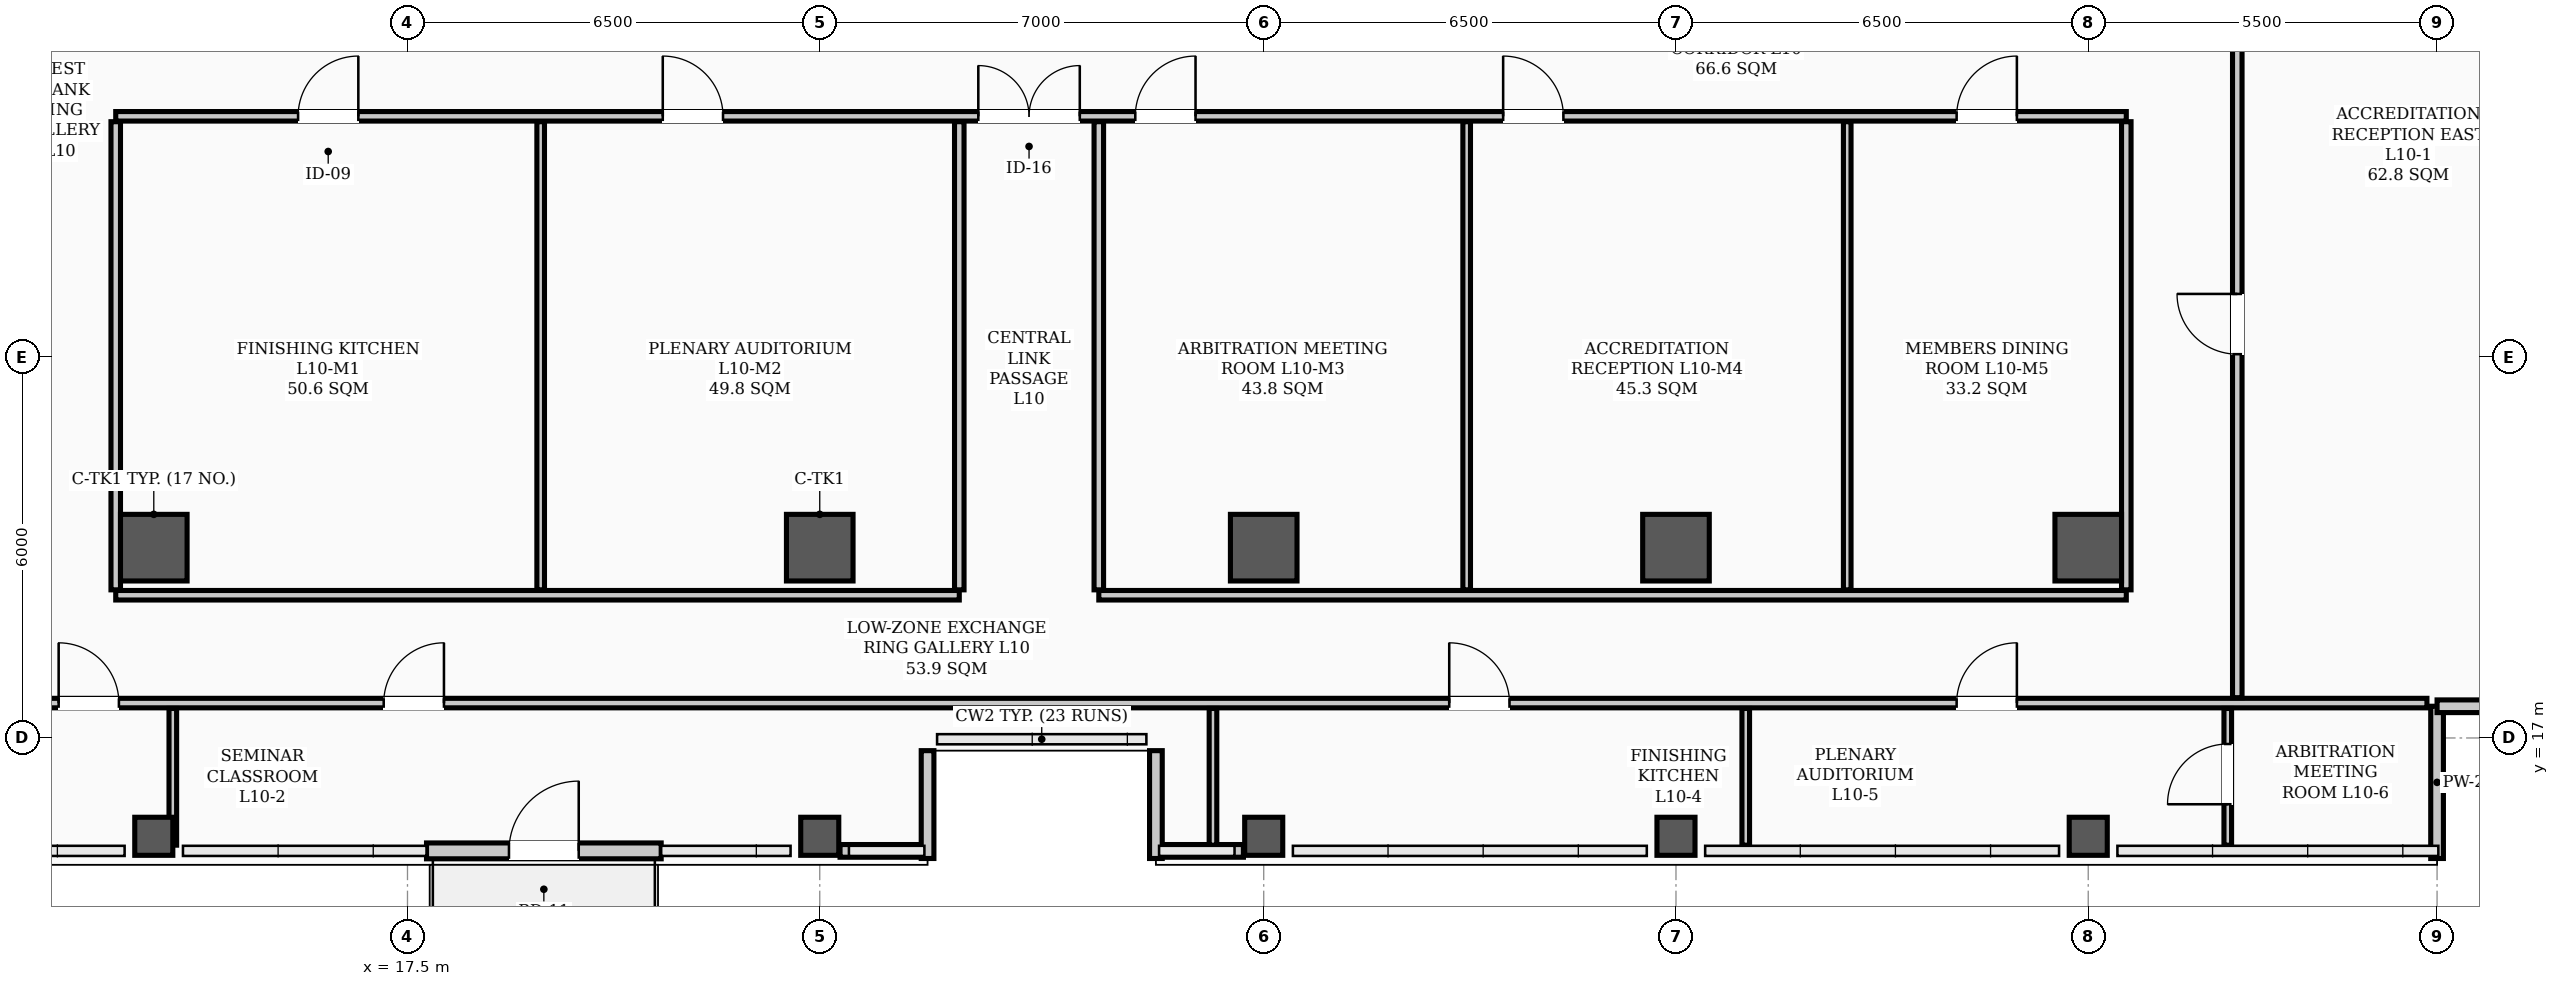
"""IFC4 building model, lengths in metres.
Left out: names, types, materials, properties, quantities, classifications, styles, units other than length and angle.
Written with IfcOpenShell. Run it as: python <this file> out.ifc"""

import sys

from ifc_helpers import new_model, si_unit, direction, frame, frame_2d, origin, origin_2d, place, context, subcontext, project, spatial, rectangle, hollow_rectangle, extrude, element, fill, save


model = new_model("IFC4")
c1 = context("Model", 3, precision=1e-05, world=origin(), true_north=direction((0.0, 1.0)))
c2 = subcontext(c1, "Body", "Model", "MODEL_VIEW")
j1 = project(units=[si_unit("LENGTHUNIT", "METRE"), si_unit("PLANEANGLEUNIT", "RADIAN")], contexts=[c1])
p1 = place(None, origin())
s1 = spatial("IfcSite", under=j1, at=p1, CompositionType="ELEMENT")
p2 = place(p1, origin())
s2 = spatial("IfcBuilding", under=s1, at=p2, CompositionType="ELEMENT")
p3 = place(p2, frame((0.0, 0.0, 42.1)))
s3 = spatial("IfcBuildingStorey", under=s2, at=p3, CompositionType="ELEMENT", Elevation=42.1)
for number, where, z_axis, x_axis in (
    (1, (13.5, 20.0, 0.0), (0.0, 0.0, 1.0), (1.0, 0.0, 0.0)),
    (2, (24.0, 20.0, 0.0), (0.0, 0.0, 1.0), (1.0, 0.0, 0.0)),
    (3, (31.0, 20.0, 0.0), (0.0, 0.0, 1.0), (1.0, 0.0, 0.0)),
    (4, (37.5, 20.0, 0.0), (0.0, 0.0, 1.0), (1.0, 0.0, 0.0)),
    (5, (44.0, 20.0, 0.0), (0.0, 0.0, 1.0), (1.0, 0.0, 0.0)),
):
    element("IfcColumn", number, at=place(p3, frame(where, z_axis=z_axis, x_axis=x_axis)), inside=s3, PredefinedType="COLUMN", context=c2, shape_type="SweptSolid", body=[
        extrude(hollow_rectangle(XDim=1.05, YDim=1.05, WallThickness=0.038, InnerFilletRadius=0.019, OuterFilletRadius=0.057, at=origin_2d()), origin(), (0.0, 0.0, 1.0), 3.9),
    ])
for number, where, z_axis, x_axis in (
    (6, (13.5, 15.45, 0.0), (0.0, 0.0, 1.0), (1.0, 0.0, 0.0)),
    (7, (24.0, 15.45, 0.0), (0.0, 0.0, 1.0), (1.0, 0.0, 0.0)),
    (8, (31.0, 15.45, 0.0), (0.0, 0.0, 1.0), (1.0, 0.0, 0.0)),
    (9, (37.5, 15.45, 0.0), (0.0, 0.0, 1.0), (1.0, 0.0, 0.0)),
    (10, (44.0, 15.45, 0.0), (0.0, 0.0, 1.0), (1.0, 0.0, 0.0)),
):
    element("IfcColumn", number, at=place(p3, frame(where, z_axis=z_axis, x_axis=x_axis)), inside=s3, PredefinedType="COLUMN", context=c2, shape_type="SweptSolid", body=[
        extrude(hollow_rectangle(XDim=0.6, YDim=0.6, WallThickness=0.026, InnerFilletRadius=0.013, OuterFilletRadius=0.039, at=origin_2d()), origin(), (0.0, 0.0, 1.0), 3.9),
    ])
for number, where, z_axis, x_axis in (
    (11, (24.32, 15.22, 0.0), (0.0, 0.0, 1.0), (1.0, 0.0, 0.0)),
    (12, (29.35, 15.22, 0.0), (0.0, 0.0, 1.0), (1.0, 0.0, 0.0)),
):
    element("IfcWall", number, at=place(p3, frame(where, z_axis=z_axis, x_axis=x_axis)), inside=s3, PredefinedType="PARAPET", context=c2, shape_type="SweptSolid", body=[
        extrude(rectangle(XDim=1.33, YDim=0.2, at=frame_2d((0.665, 0.0))), origin(), (0.0, 0.0, 1.0), 1.2),
    ])
for number, where, z_axis, x_axis in (
    (13, (49.5, 15.1, 0.0), (0.0, 0.0, 1.0), (0.0, 1.0, 0.0)),
    (14, (49.5, 17.5, 0.0), (0.0, 0.0, 1.0), (1.0, 0.0, 0.0)),
):
    element("IfcWall", number, at=place(p3, frame(where, z_axis=z_axis, x_axis=x_axis)), inside=s3, PredefinedType="PARAPET", context=c2, shape_type="SweptSolid", body=[
        extrude(rectangle(XDim=2.4, YDim=0.2, at=frame_2d((1.2, 0.0))), origin(), (0.0, 0.0, 1.0), 1.2),
    ])
for number, where, z_axis, x_axis in (
    (15, (25.7, 15.1, 0.0), (0.0, 0.0, 1.0), (0.0, 1.0, 0.0)),
    (16, (29.3, 16.8, 0.0), (0.0, 0.0, 1.0), (0.0, -1.0, 0.0)),
):
    element("IfcWall", number, at=place(p3, frame(where, z_axis=z_axis, x_axis=x_axis)), inside=s3, PredefinedType="PARAPET", context=c2, shape_type="SweptSolid", body=[
        extrude(rectangle(XDim=1.7, YDim=0.2, at=frame_2d((0.85, 0.0))), origin(), (0.0, 0.0, 1.0), 1.2),
    ])
p4 = place(p3, frame((17.8, 15.22, 0.0), z_axis=(0.0, 0.0, 1.0), x_axis=(1.0, 0.0, 0.0)))
e17 = element("IfcWall", 17, at=p4, inside=s3, PredefinedType="STANDARD", context=c2, shape_type="SweptSolid", body=[
    extrude(rectangle(XDim=3.7, YDim=0.25, at=frame_2d((1.85, 0.0))), origin(), (0.0, 0.0, 1.0), 3.18),
])
p5 = place(p4, frame((1.3, 0.0, 0.0)))
e18 = element("IfcOpeningElement", 18, at=p5, cuts=e17, PredefinedType="OPENING", context=c2, shape_type="SweptSolid", body=[
    extrude(rectangle(XDim=1.1, YDim=2.2, at=frame_2d((0.55, 1.1))), frame((0.0, 0.135, 0.0), z_axis=(0.0, -1.0, 0.0), x_axis=(1.0, 0.0, 0.0)), (0.0, 0.0, 1.0), 0.27),
])
p6 = place(p3, frame((12.9, 26.8, 0.0), z_axis=(0.0, 0.0, 1.0), x_axis=(1.0, 0.0, 0.0)))
e19 = element("IfcWall", 19, at=p6, inside=s3, PredefinedType="PARTITIONING", context=c2, shape_type="SweptSolid", body=[
    extrude(rectangle(XDim=31.7, YDim=0.15, at=frame_2d((15.85, 0.0))), origin(), (0.0, 0.0, 1.0), 3.1),
])
p7 = place(p6, frame((13.6, 0.0, 0.0)))
e20 = element("IfcOpeningElement", 20, at=p7, cuts=e19, PredefinedType="OPENING", context=c2, shape_type="SweptSolid", body=[
    extrude(rectangle(XDim=1.6, YDim=2.08, at=frame_2d((0.8, 1.04))), frame((0.0, 0.085, 0.0), z_axis=(0.0, -1.0, 0.0), x_axis=(1.0, 0.0, 0.0)), (0.0, 0.0, 1.0), 0.17),
])
p8 = place(p6, frame((2.875, 0.0, 0.0)))
e21 = element("IfcOpeningElement", 21, at=p8, cuts=e19, PredefinedType="OPENING", context=c2, shape_type="SweptSolid", body=[
    extrude(rectangle(XDim=0.95, YDim=2.08, at=frame_2d((0.475, 1.04))), frame((0.0, 0.085, 0.0), z_axis=(0.0, -1.0, 0.0), x_axis=(1.0, 0.0, 0.0)), (0.0, 0.0, 1.0), 0.17),
])
p9 = place(p6, frame((8.625, 0.0, 0.0)))
e22 = element("IfcOpeningElement", 22, at=p9, cuts=e19, PredefinedType="OPENING", context=c2, shape_type="SweptSolid", body=[
    extrude(rectangle(XDim=0.95, YDim=2.08, at=frame_2d((0.475, 1.04))), frame((0.0, 0.085, 0.0), z_axis=(0.0, -1.0, 0.0), x_axis=(1.0, 0.0, 0.0)), (0.0, 0.0, 1.0), 0.17),
])
p10 = place(p6, frame((16.075, 0.0, 0.0)))
e23 = element("IfcOpeningElement", 23, at=p10, cuts=e19, PredefinedType="OPENING", context=c2, shape_type="SweptSolid", body=[
    extrude(rectangle(XDim=0.95, YDim=2.08, at=frame_2d((0.475, 1.04))), frame((0.0, 0.085, 0.0), z_axis=(0.0, -1.0, 0.0), x_axis=(1.0, 0.0, 0.0)), (0.0, 0.0, 1.0), 0.17),
])
p11 = place(p6, frame((21.875, 0.0, 0.0)))
e24 = element("IfcOpeningElement", 24, at=p11, cuts=e19, PredefinedType="OPENING", context=c2, shape_type="SweptSolid", body=[
    extrude(rectangle(XDim=0.95, YDim=2.08, at=frame_2d((0.475, 1.04))), frame((0.0, 0.085, 0.0), z_axis=(0.0, -1.0, 0.0), x_axis=(1.0, 0.0, 0.0)), (0.0, 0.0, 1.0), 0.17),
])
p12 = place(p6, frame((29.025, 0.0, 0.0)))
e25 = element("IfcOpeningElement", 25, at=p12, cuts=e19, PredefinedType="OPENING", context=c2, shape_type="SweptSolid", body=[
    extrude(rectangle(XDim=0.95, YDim=2.08, at=frame_2d((0.475, 1.04))), frame((0.0, 0.085, 0.0), z_axis=(0.0, -1.0, 0.0), x_axis=(1.0, 0.0, 0.0)), (0.0, 0.0, 1.0), 0.17),
])
p13 = place(p3, frame((4.66, 17.55, 0.0), z_axis=(0.0, 0.0, 1.0), x_axis=(1.0, 0.0, 0.0)))
e26 = element("IfcWall", 26, at=p13, inside=s3, PredefinedType="PARTITIONING", context=c2, shape_type="SweptSolid", body=[
    extrude(rectangle(XDim=44.68, YDim=0.15, at=frame_2d((22.34, 0.0))), origin(), (0.0, 0.0, 1.0), 3.1),
])
p14 = place(p13, frame((7.34, 0.0, 0.0)))
e27 = element("IfcOpeningElement", 27, at=p14, cuts=e26, PredefinedType="OPENING", context=c2, shape_type="SweptSolid", body=[
    extrude(rectangle(XDim=0.95, YDim=2.08, at=frame_2d((0.475, 1.04))), frame((0.0, 0.085, 0.0), z_axis=(0.0, -1.0, 0.0), x_axis=(1.0, 0.0, 0.0)), (0.0, 0.0, 1.0), 0.17),
])
p15 = place(p13, frame((12.465, 0.0, 0.0)))
e28 = element("IfcOpeningElement", 28, at=p15, cuts=e26, PredefinedType="OPENING", context=c2, shape_type="SweptSolid", body=[
    extrude(rectangle(XDim=0.95, YDim=2.08, at=frame_2d((0.475, 1.04))), frame((0.0, 0.085, 0.0), z_axis=(0.0, -1.0, 0.0), x_axis=(1.0, 0.0, 0.0)), (0.0, 0.0, 1.0), 0.17),
])
p16 = place(p13, frame((29.265, 0.0, 0.0)))
e29 = element("IfcOpeningElement", 29, at=p16, cuts=e26, PredefinedType="OPENING", context=c2, shape_type="SweptSolid", body=[
    extrude(rectangle(XDim=0.95, YDim=2.08, at=frame_2d((0.475, 1.04))), frame((0.0, 0.085, 0.0), z_axis=(0.0, -1.0, 0.0), x_axis=(1.0, 0.0, 0.0)), (0.0, 0.0, 1.0), 0.17),
])
p17 = place(p13, frame((37.265, 0.0, 0.0)))
e30 = element("IfcOpeningElement", 30, at=p17, cuts=e26, PredefinedType="OPENING", context=c2, shape_type="SweptSolid", body=[
    extrude(rectangle(XDim=0.95, YDim=2.08, at=frame_2d((0.475, 1.04))), frame((0.0, 0.085, 0.0), z_axis=(0.0, -1.0, 0.0), x_axis=(1.0, 0.0, 0.0)), (0.0, 0.0, 1.0), 0.17),
])
p18 = place(p3, frame((12.9, 19.25, 0.0), z_axis=(0.0, 0.0, 1.0), x_axis=(1.0, 0.0, 0.0)))
e31 = element("IfcWall", 31, at=p18, inside=s3, PredefinedType="PARTITIONING", context=c2, shape_type="SweptSolid", body=[
    extrude(rectangle(XDim=13.3, YDim=0.15, at=frame_2d((6.65, 0.0))), origin(), (0.0, 0.0, 1.0), 3.1),
])
p19 = place(p3, frame((28.4, 19.25, 0.0), z_axis=(0.0, 0.0, 1.0), x_axis=(1.0, 0.0, 0.0)))
e32 = element("IfcWall", 32, at=p19, inside=s3, PredefinedType="PARTITIONING", context=c2, shape_type="SweptSolid", body=[
    extrude(rectangle(XDim=16.2, YDim=0.15, at=frame_2d((8.1, 0.0))), origin(), (0.0, 0.0, 1.0), 3.1),
])
for number, where, z_axis, x_axis in (
    (33, (26.2, 19.335, 0.0), (0.0, 0.0, 1.0), (0.0, 1.0, 0.0)),
    (34, (28.4, 19.335, 0.0), (0.0, 0.0, 1.0), (0.0, 1.0, 0.0)),
    (35, (12.9, 19.335, 0.0), (0.0, 0.0, 1.0), (0.0, 1.0, 0.0)),
):
    element("IfcWall", number, at=place(p3, frame(where, z_axis=z_axis, x_axis=x_axis)), inside=s3, PredefinedType="PARTITIONING", context=c2, shape_type="SweptSolid", body=[
        extrude(rectangle(XDim=7.38, YDim=0.15, at=frame_2d((3.69, 0.0))), origin(), (0.0, 0.0, 1.0), 3.0),
    ])
p20 = place(p3, frame((46.35, 17.635, 0.0), z_axis=(0.0, 0.0, 1.0), x_axis=(0.0, 1.0, 0.0)))
e36 = element("IfcWall", 36, at=p20, inside=s3, PredefinedType="PARTITIONING", context=c2, shape_type="SweptSolid", body=[
    extrude(rectangle(XDim=22.53, YDim=0.15, at=frame_2d((11.265, 0.0))), origin(), (0.0, 0.0, 1.0), 3.0),
])
p21 = place(p20, frame((5.415, 0.0, 0.0)))
e37 = element("IfcOpeningElement", 37, at=p21, cuts=e36, PredefinedType="OPENING", context=c2, shape_type="SweptSolid", body=[
    extrude(rectangle(XDim=0.95, YDim=2.08, at=frame_2d((0.475, 1.04))), frame((0.0, 0.085, 0.0), z_axis=(0.0, -1.0, 0.0), x_axis=(1.0, 0.0, 0.0)), (0.0, 0.0, 1.0), 0.17),
])
p22 = place(p20, frame((16.765, 0.0, 0.0)))
e38 = element("IfcOpeningElement", 38, at=p22, cuts=e36, PredefinedType="OPENING", context=c2, shape_type="SweptSolid", body=[
    extrude(rectangle(XDim=0.95, YDim=2.08, at=frame_2d((0.475, 1.04))), frame((0.0, 0.085, 0.0), z_axis=(0.0, -1.0, 0.0), x_axis=(1.0, 0.0, 0.0)), (0.0, 0.0, 1.0), 0.17),
])
p23 = place(p3, frame((44.6, 19.335, 0.0), z_axis=(0.0, 0.0, 1.0), x_axis=(0.0, 1.0, 0.0)))
e39 = element("IfcWall", 39, at=p23, inside=s3, PredefinedType="PARTITIONING", context=c2, shape_type="SweptSolid", body=[
    extrude(rectangle(XDim=7.38, YDim=0.15, at=frame_2d((3.69, 0.0))), origin(), (0.0, 0.0, 1.0), 3.0),
])
p24 = place(p3, frame((13.8, 15.31, 0.0), z_axis=(0.0, 0.0, 1.0), x_axis=(0.0, 1.0, 0.0)))
e40 = element("IfcWall", 40, at=p24, inside=s3, PredefinedType="PARTITIONING", context=c2, shape_type="SweptSolid", body=[
    extrude(rectangle(XDim=2.155, YDim=0.12, at=frame_2d((1.078, 0.0))), origin(), (0.0, 0.0, 1.0), 3.1),
])
for number, where, z_axis, x_axis in (
    (41, (30.2, 15.31, 0.0), (0.0, 0.0, 1.0), (0.0, 1.0, 0.0)),
    (42, (38.6, 15.31, 0.0), (0.0, 0.0, 1.0), (0.0, 1.0, 0.0)),
):
    element("IfcWall", number, at=place(p3, frame(where, z_axis=z_axis, x_axis=x_axis)), inside=s3, PredefinedType="PARTITIONING", context=c2, shape_type="SweptSolid", body=[
        extrude(rectangle(XDim=2.155, YDim=0.12, at=frame_2d((1.078, 0.0))), origin(), (0.0, 0.0, 1.0), 3.212),
    ])
p25 = place(p3, frame((46.2, 15.31, 0.0), z_axis=(0.0, 0.0, 1.0), x_axis=(0.0, 1.0, 0.0)))
e43 = element("IfcWall", 43, at=p25, inside=s3, PredefinedType="PARTITIONING", context=c2, shape_type="SweptSolid", body=[
    extrude(rectangle(XDim=2.155, YDim=0.12, at=frame_2d((1.078, 0.0))), origin(), (0.0, 0.0, 1.0), 3.72),
])
p26 = place(p25, frame((0.645, 0.0, 0.0)))
e44 = element("IfcOpeningElement", 44, at=p26, cuts=e43, PredefinedType="OPENING", context=c2, shape_type="SweptSolid", body=[
    extrude(rectangle(XDim=0.95, YDim=2.08, at=frame_2d((0.475, 1.04))), frame((0.0, 0.07, 0.0), z_axis=(0.0, -1.0, 0.0), x_axis=(1.0, 0.0, 0.0)), (0.0, 0.0, 1.0), 0.14),
])
for number, where, z_axis, x_axis in (
    (45, (19.6, 19.335, 0.0), (0.0, 0.0, 1.0), (0.0, 1.0, 0.0)),
    (46, (34.2, 19.335, 0.0), (0.0, 0.0, 1.0), (0.0, 1.0, 0.0)),
    (47, (40.2, 19.335, 0.0), (0.0, 0.0, 1.0), (0.0, 1.0, 0.0)),
):
    element("IfcWall", number, at=place(p3, frame(where, z_axis=z_axis, x_axis=x_axis)), inside=s3, PredefinedType="PARTITIONING", context=c2, shape_type="SweptSolid", body=[
        extrude(rectangle(XDim=7.38, YDim=0.12, at=frame_2d((3.69, 0.0))), origin(), (0.0, 0.0, 1.0), 3.0),
    ])
p27 = place(p5, origin())
e48 = element("IfcDoor", 48, at=p27, inside=s3, OperationType="SINGLE_SWING_RIGHT", PredefinedType="DOOR", context=c2, shape_type="SweptSolid", body=[
    extrude(rectangle(XDim=1.1, YDim=2.2, at=frame_2d((0.55, 1.1))), frame((0.0, 0.025, 0.0), z_axis=(0.0, -1.0, 0.0), x_axis=(1.0, 0.0, 0.0)), (0.0, 0.0, 1.0), 0.05),
])
fill(e18, e48)
p28 = place(p7, origin())
e49 = element("IfcDoor", 49, at=p28, inside=s3, OperationType="DOUBLE_DOOR_SINGLE_SWING", PredefinedType="DOOR", context=c2, shape_type="SweptSolid", body=[
    extrude(rectangle(XDim=1.6, YDim=2.08, at=frame_2d((0.8, 1.04))), frame((0.0, 0.025, 0.0), z_axis=(0.0, -1.0, 0.0), x_axis=(1.0, 0.0, 0.0)), (0.0, 0.0, 1.0), 0.05),
])
fill(e20, e49)
p29 = place(p14, origin())
e50 = element("IfcDoor", 50, at=p29, inside=s3, OperationType="SINGLE_SWING_LEFT", PredefinedType="DOOR", context=c2, shape_type="SweptSolid", body=[
    extrude(rectangle(XDim=0.95, YDim=2.08, at=frame_2d((0.475, 1.04))), frame((0.0, 0.025, 0.0), z_axis=(0.0, -1.0, 0.0), x_axis=(1.0, 0.0, 0.0)), (0.0, 0.0, 1.0), 0.05),
])
fill(e27, e50)
p30 = place(p15, origin())
e51 = element("IfcDoor", 51, at=p30, inside=s3, OperationType="SINGLE_SWING_RIGHT", PredefinedType="DOOR", context=c2, shape_type="SweptSolid", body=[
    extrude(rectangle(XDim=0.95, YDim=2.08, at=frame_2d((0.475, 1.04))), frame((0.0, 0.025, 0.0), z_axis=(0.0, -1.0, 0.0), x_axis=(1.0, 0.0, 0.0)), (0.0, 0.0, 1.0), 0.05),
])
fill(e28, e51)
p31 = place(p16, origin())
e52 = element("IfcDoor", 52, at=p31, inside=s3, OperationType="SINGLE_SWING_LEFT", PredefinedType="DOOR", context=c2, shape_type="SweptSolid", body=[
    extrude(rectangle(XDim=0.95, YDim=2.08, at=frame_2d((0.475, 1.04))), frame((0.0, 0.025, 0.0), z_axis=(0.0, -1.0, 0.0), x_axis=(1.0, 0.0, 0.0)), (0.0, 0.0, 1.0), 0.05),
])
fill(e29, e52)
p32 = place(p17, origin())
e53 = element("IfcDoor", 53, at=p32, inside=s3, OperationType="SINGLE_SWING_RIGHT", PredefinedType="DOOR", context=c2, shape_type="SweptSolid", body=[
    extrude(rectangle(XDim=0.95, YDim=2.08, at=frame_2d((0.475, 1.04))), frame((0.0, 0.025, 0.0), z_axis=(0.0, -1.0, 0.0), x_axis=(1.0, 0.0, 0.0)), (0.0, 0.0, 1.0), 0.05),
])
fill(e30, e53)
p33 = place(p26, origin())
e54 = element("IfcDoor", 54, at=p33, inside=s3, OperationType="SINGLE_SWING_LEFT", PredefinedType="DOOR", context=c2, shape_type="SweptSolid", body=[
    extrude(rectangle(XDim=0.95, YDim=2.08, at=frame_2d((0.475, 1.04))), frame((0.0, 0.025, 0.0), z_axis=(0.0, -1.0, 0.0), x_axis=(1.0, 0.0, 0.0)), (0.0, 0.0, 1.0), 0.05),
])
fill(e44, e54)
p34 = place(p8, origin())
e55 = element("IfcDoor", 55, at=p34, inside=s3, OperationType="SINGLE_SWING_RIGHT", PredefinedType="DOOR", context=c2, shape_type="SweptSolid", body=[
    extrude(rectangle(XDim=0.95, YDim=2.08, at=frame_2d((0.475, 1.04))), frame((0.0, 0.025, 0.0), z_axis=(0.0, -1.0, 0.0), x_axis=(1.0, 0.0, 0.0)), (0.0, 0.0, 1.0), 0.05),
])
fill(e21, e55)
p35 = place(p9, origin())
e56 = element("IfcDoor", 56, at=p35, inside=s3, OperationType="SINGLE_SWING_LEFT", PredefinedType="DOOR", context=c2, shape_type="SweptSolid", body=[
    extrude(rectangle(XDim=0.95, YDim=2.08, at=frame_2d((0.475, 1.04))), frame((0.0, 0.025, 0.0), z_axis=(0.0, -1.0, 0.0), x_axis=(1.0, 0.0, 0.0)), (0.0, 0.0, 1.0), 0.05),
])
fill(e22, e56)
p36 = place(p10, origin())
e57 = element("IfcDoor", 57, at=p36, inside=s3, OperationType="SINGLE_SWING_RIGHT", PredefinedType="DOOR", context=c2, shape_type="SweptSolid", body=[
    extrude(rectangle(XDim=0.95, YDim=2.08, at=frame_2d((0.475, 1.04))), frame((0.0, 0.025, 0.0), z_axis=(0.0, -1.0, 0.0), x_axis=(1.0, 0.0, 0.0)), (0.0, 0.0, 1.0), 0.05),
])
fill(e23, e57)
p37 = place(p11, origin())
e58 = element("IfcDoor", 58, at=p37, inside=s3, OperationType="SINGLE_SWING_LEFT", PredefinedType="DOOR", context=c2, shape_type="SweptSolid", body=[
    extrude(rectangle(XDim=0.95, YDim=2.08, at=frame_2d((0.475, 1.04))), frame((0.0, 0.025, 0.0), z_axis=(0.0, -1.0, 0.0), x_axis=(1.0, 0.0, 0.0)), (0.0, 0.0, 1.0), 0.05),
])
fill(e24, e58)
p38 = place(p12, origin())
e59 = element("IfcDoor", 59, at=p38, inside=s3, OperationType="SINGLE_SWING_RIGHT", PredefinedType="DOOR", context=c2, shape_type="SweptSolid", body=[
    extrude(rectangle(XDim=0.95, YDim=2.08, at=frame_2d((0.475, 1.04))), frame((0.0, 0.025, 0.0), z_axis=(0.0, -1.0, 0.0), x_axis=(1.0, 0.0, 0.0)), (0.0, 0.0, 1.0), 0.05),
])
fill(e25, e59)
p39 = place(p21, origin())
e60 = element("IfcDoor", 60, at=p39, inside=s3, OperationType="SINGLE_SWING_RIGHT", PredefinedType="DOOR", context=c2, shape_type="SweptSolid", body=[
    extrude(rectangle(XDim=0.95, YDim=2.08, at=frame_2d((0.475, 1.04))), frame((0.0, 0.025, 0.0), z_axis=(0.0, -1.0, 0.0), x_axis=(1.0, 0.0, 0.0)), (0.0, 0.0, 1.0), 0.05),
])
fill(e37, e60)
save(model, sys.argv[1])
